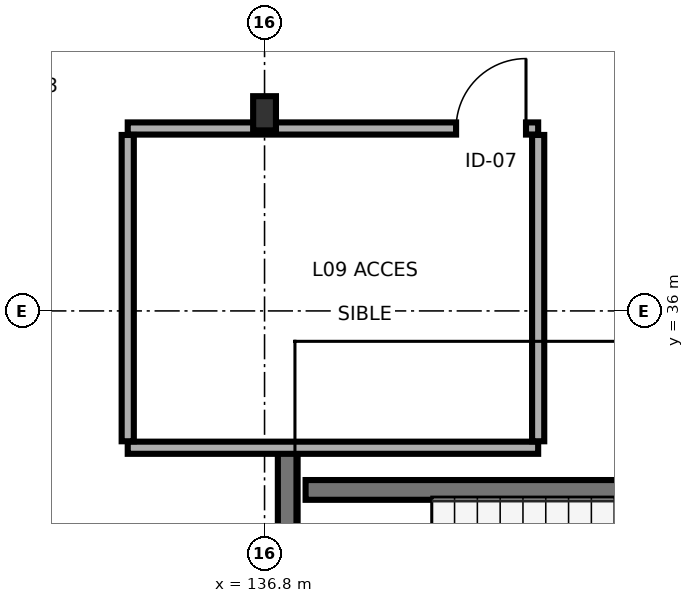
"""IFC4 building model, lengths in metres.
Left out: names, types, materials, properties, quantities, classifications, styles, units other than length and angle.
Written with IfcOpenShell. Run it as: python <this file> out.ifc"""

import sys

from ifc_helpers import new_model, si_unit, direction, frame, frame_2d, origin, origin_2d, place, context, subcontext, project, spatial, rectangle, i_section, extrude, element, fill, save


model = new_model("IFC4")
c1 = context("Model", 3, precision=1e-05, world=origin(), true_north=direction((0.0, 1.0)))
c2 = subcontext(c1, "Body", "Model", "MODEL_VIEW")
j1 = project(units=[si_unit("LENGTHUNIT", "METRE"), si_unit("PLANEANGLEUNIT", "RADIAN")], contexts=[c1])
p1 = place(None, origin())
s1 = spatial("IfcSite", under=j1, at=p1, CompositionType="ELEMENT")
p2 = place(p1, origin())
s2 = spatial("IfcBuilding", under=s1, at=p2, CompositionType="ELEMENT")
p3 = place(p2, frame((0.0, 0.0, 31.7)))
s3 = spatial("IfcBuildingStorey", under=s2, at=p3, CompositionType="ELEMENT", Elevation=31.7)
p4 = place(p3, frame((136.8, 38.6, 0.0), z_axis=(0.0, 0.0, 1.0), x_axis=(1.0, 0.0, 0.0)))
e1 = element("IfcColumn", 1, at=p4, inside=s3, PredefinedType="COLUMN", context=c2, shape_type="SweptSolid", body=[
    extrude(i_section(OverallWidth=0.3, OverallDepth=0.45, WebThickness=0.014, FlangeThickness=0.026, FilletRadius=0.027, at=origin_2d()), origin(), (0.0, 0.0, 1.0), 3.4),
])
p5 = place(p3, frame((137.105, 29.54, 0.0), z_axis=(0.0, 0.0, 1.0), x_axis=(0.0, 1.0, 0.0)))
e2 = element("IfcWall", 2, at=p5, inside=s3, PredefinedType="SHEAR", context=c2, shape_type="SweptSolid", body=[
    extrude(rectangle(XDim=4.635, YDim=0.26, at=frame_2d((2.317, 0.0))), origin(), (0.0, 0.0, 1.0), 3.17),
])
p6 = place(p5, frame((0.61, 0.0, 0.0)))
e3 = element("IfcOpeningElement", 3, at=p6, cuts=e2, PredefinedType="OPENING", context=c2, shape_type="SweptSolid", body=[
    extrude(rectangle(XDim=1.1, YDim=2.2, at=frame_2d((0.55, 1.1))), frame((0.0, 0.14, 0.0), z_axis=(0.0, -1.0, 0.0), x_axis=(1.0, 0.0, 0.0)), (0.0, 0.0, 1.0), 0.28),
])
p7 = place(p3, frame((137.34, 33.645, 0.0), z_axis=(0.0, 0.0, 1.0), x_axis=(1.0, 0.0, 0.0)))
e4 = element("IfcWall", 4, at=p7, inside=s3, PredefinedType="SHEAR", context=c2, shape_type="SweptSolid", body=[
    extrude(rectangle(XDim=8.52, YDim=0.26, at=frame_2d((4.26, 0.0))), origin(), (0.0, 0.0, 1.0), 3.17),
])
p8 = place(p3, frame((135.0, 34.2, 0.0), z_axis=(0.0, 0.0, 1.0), x_axis=(1.0, 0.0, 0.0)))
e5 = element("IfcWall", 5, at=p8, inside=s3, PredefinedType="PARTITIONING", context=c2, shape_type="SweptSolid", body=[
    extrude(rectangle(XDim=5.4, YDim=0.16, at=frame_2d((2.7, 0.0))), origin(), (0.0, 0.0, 1.0), 2.705),
])
p9 = place(p3, frame((135.0, 38.4, 0.0), z_axis=(0.0, 0.0, 1.0), x_axis=(1.0, 0.0, 0.0)))
e6 = element("IfcWall", 6, at=p9, inside=s3, PredefinedType="PARTITIONING", context=c2, shape_type="SweptSolid", body=[
    extrude(rectangle(XDim=5.4, YDim=0.16, at=frame_2d((2.7, 0.0))), origin(), (0.0, 0.0, 1.0), 2.705),
])
p10 = place(p9, frame((4.32, 0.0, 0.0)))
e7 = element("IfcOpeningElement", 7, at=p10, cuts=e6, PredefinedType="OPENING", context=c2, shape_type="SweptSolid", body=[
    extrude(rectangle(XDim=0.92, YDim=2.1, at=frame_2d((0.46, 1.05))), frame((0.0, 0.09, 0.0), z_axis=(0.0, -1.0, 0.0), x_axis=(1.0, 0.0, 0.0)), (0.0, 0.0, 1.0), 0.18),
])
p11 = place(p3, frame((135.0, 34.285, 0.0), z_axis=(0.0, 0.0, 1.0), x_axis=(0.0, 1.0, 0.0)))
e8 = element("IfcWall", 8, at=p11, inside=s3, PredefinedType="PARTITIONING", context=c2, shape_type="SweptSolid", body=[
    extrude(rectangle(XDim=4.03, YDim=0.16, at=frame_2d((2.015, 0.0))), origin(), (0.0, 0.0, 1.0), 2.755),
])
p12 = place(p3, frame((140.4, 34.285, 0.0), z_axis=(0.0, 0.0, 1.0), x_axis=(0.0, 1.0, 0.0)))
e9 = element("IfcWall", 9, at=p12, inside=s3, PredefinedType="PARTITIONING", context=c2, shape_type="SweptSolid", body=[
    extrude(rectangle(XDim=4.03, YDim=0.16, at=frame_2d((2.015, 0.0))), origin(), (0.0, 0.0, 1.0), 3.17),
])
p13 = place(p10, origin())
e10 = element("IfcDoor", 10, at=p13, inside=s3, OperationType="SINGLE_SWING_RIGHT", PredefinedType="DOOR", context=c2, shape_type="SweptSolid", body=[
    extrude(rectangle(XDim=0.92, YDim=2.1, at=frame_2d((0.46, 1.05))), frame((0.0, 0.025, 0.0), z_axis=(0.0, -1.0, 0.0), x_axis=(1.0, 0.0, 0.0)), (0.0, 0.0, 1.0), 0.05),
])
fill(e7, e10)
save(model, sys.argv[1])
